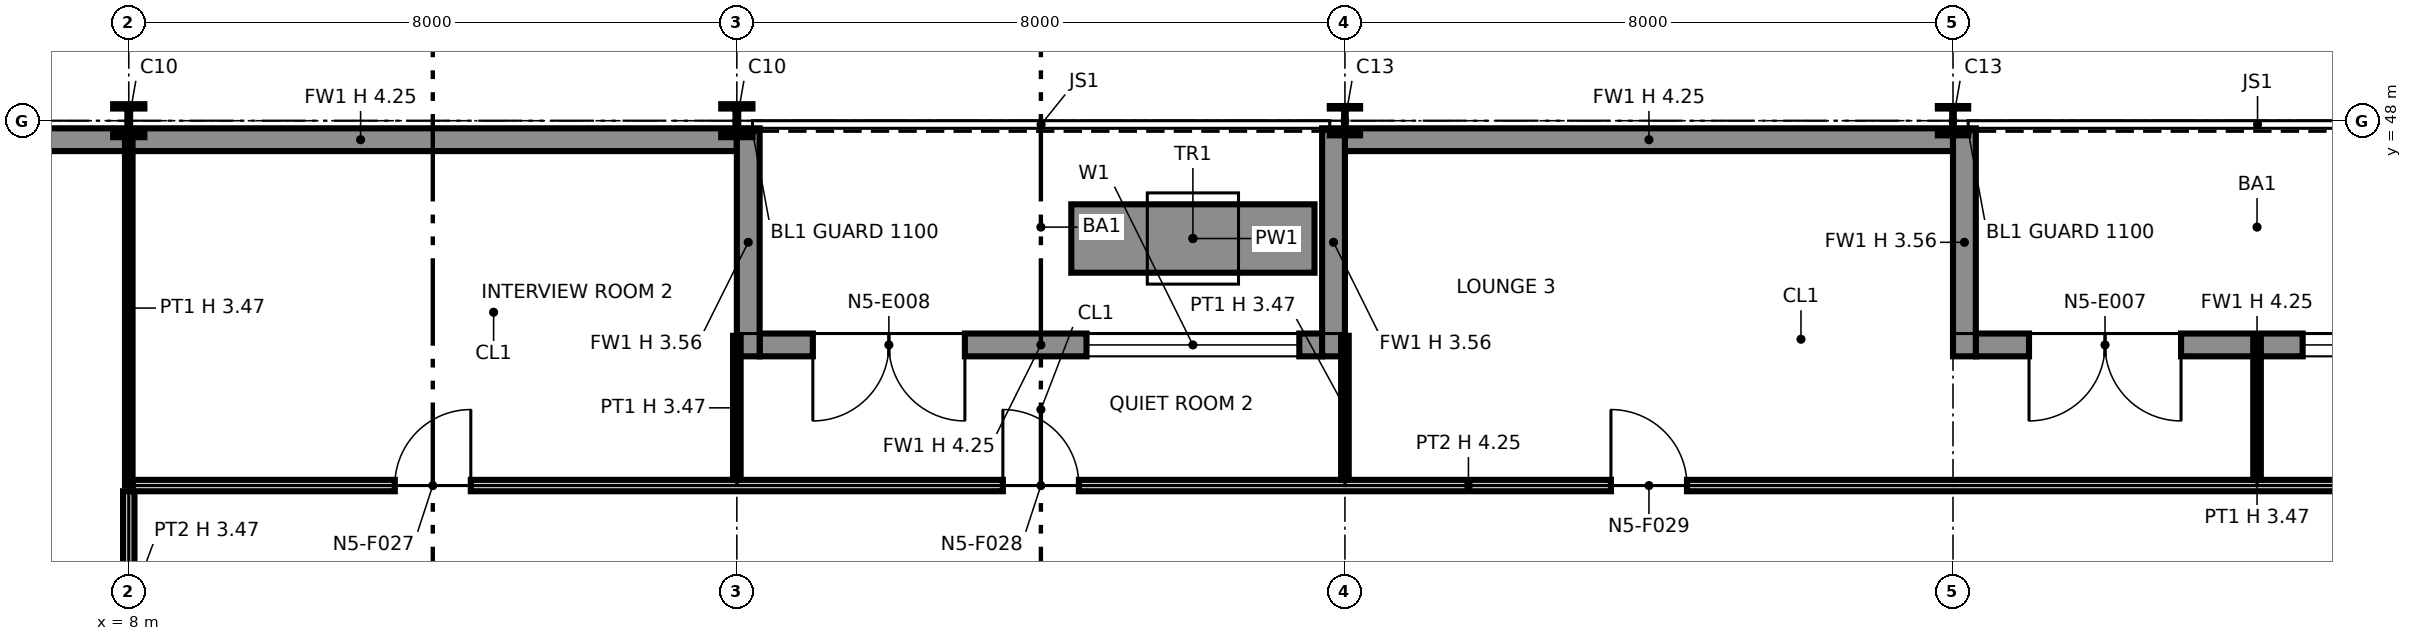
"""IFC4 building model, lengths in metres.
Left out: names, types, materials, properties, quantities, classifications, styles, units other than length and angle.
Written with IfcOpenShell. Run it as: python <this file> out.ifc"""

import sys

from ifc_helpers import new_model, si_unit, direction, frame, frame_2d, origin, origin_2d, place, context, subcontext, project, spatial, rectangle, i_section, extrude, element, fill, save


model = new_model("IFC4")
c1 = context("Model", 3, precision=1e-05, world=origin(), true_north=direction((0.0, 1.0)))
c2 = subcontext(c1, "Body", "Model", "MODEL_VIEW")
j1 = project(units=[si_unit("LENGTHUNIT", "METRE"), si_unit("PLANEANGLEUNIT", "RADIAN")], contexts=[c1])
p1 = place(None, origin())
s1 = spatial("IfcSite", under=j1, at=p1, CompositionType="ELEMENT")
p2 = place(p1, origin())
s2 = spatial("IfcBuilding", under=s1, at=p2, CompositionType="ELEMENT")
p3 = place(p2, frame((0.0, 0.0, 92.0)))
s3 = spatial("IfcBuildingStorey", under=s2, at=p3, CompositionType="ELEMENT", Elevation=92.0)
for number, where, z_axis, x_axis in (
    (1, (8.0, 48.0, 0.0), (0.0, 0.0, 1.0), (1.0, 0.0, 0.0)),
    (2, (16.0, 48.0, 0.0), (0.0, 0.0, 1.0), (1.0, 0.0, 0.0)),
):
    element("IfcColumn", number, at=place(p3, frame(where, z_axis=z_axis, x_axis=x_axis)), inside=s3, PredefinedType="COLUMN", context=c2, shape_type="SweptSolid", body=[
        extrude(i_section(OverallWidth=0.411, OverallDepth=0.434, WebThickness=0.036, FlangeThickness=0.057, at=origin_2d()), origin(), (0.0, 0.0, 1.0), 4.25),
    ])
for number, where, z_axis, x_axis in (
    (3, (24.0, 48.0, 0.0), (0.0, 0.0, 1.0), (1.0, 0.0, 0.0)),
    (4, (32.0, 48.0, 0.0), (0.0, 0.0, 1.0), (1.0, 0.0, 0.0)),
):
    element("IfcColumn", number, at=place(p3, frame(where, z_axis=z_axis, x_axis=x_axis)), inside=s3, PredefinedType="COLUMN", context=c2, shape_type="SweptSolid", body=[
        extrude(i_section(OverallWidth=0.399, OverallDepth=0.386, WebThickness=0.021, FlangeThickness=0.033, at=origin_2d()), origin(), (0.0, 0.0, 1.0), 4.25),
    ])
p4 = place(p3, frame((39.7, 45.05, 0.0), z_axis=(0.0, 0.0, 1.0), x_axis=(-1.0, 0.0, 0.0)))
e5 = element("IfcWall", 5, at=p4, inside=s3, PredefinedType="SOLIDWALL", context=c2, shape_type="SweptSolid", body=[
    extrude(rectangle(XDim=7.4, YDim=0.3, at=frame_2d((3.7, 0.0))), origin(), (0.0, 0.0, 1.0), 4.25),
])
p5 = place(p4, frame((0.3, 0.0, 0.9)))
e6 = element("IfcOpeningElement", 6, at=p5, cuts=e5, PredefinedType="OPENING", context=c2, shape_type="SweptSolid", body=[
    extrude(rectangle(XDim=2.8, YDim=2.2, at=frame_2d((1.4, 1.1))), frame((0.0, 0.16, 0.0), z_axis=(0.0, -1.0, 0.0), x_axis=(1.0, 0.0, 0.0)), (0.0, 0.0, 1.0), 0.32),
])
p6 = place(p4, frame((4.7, 0.0, 0.0)))
e7 = element("IfcOpeningElement", 7, at=p6, cuts=e5, PredefinedType="OPENING", context=c2, shape_type="SweptSolid", body=[
    extrude(rectangle(XDim=2.0, YDim=2.4, at=frame_2d((1.0, 1.2))), frame((0.0, 0.16, 0.0), z_axis=(0.0, -1.0, 0.0), x_axis=(1.0, 0.0, 0.0)), (0.0, 0.0, 1.0), 0.32),
])
p7 = place(p3, frame((32.15, 47.9, 0.0), z_axis=(0.0, 0.0, 1.0), x_axis=(0.0, -1.0, 0.0)))
e8 = element("IfcWall", 8, at=p7, inside=s3, PredefinedType="SOLIDWALL", context=c2, shape_type="SweptSolid", body=[
    extrude(rectangle(XDim=3.0, YDim=0.3, at=frame_2d((1.5, 0.0))), origin(), (0.0, 0.0, 1.0), 3.556),
])
p8 = place(p3, frame((32.0, 47.75, 0.0), z_axis=(0.0, 0.0, 1.0), x_axis=(-1.0, 0.0, 0.0)))
e9 = element("IfcWall", 9, at=p8, inside=s3, PredefinedType="SOLIDWALL", context=c2, shape_type="SweptSolid", body=[
    extrude(rectangle(XDim=8.0, YDim=0.3, at=frame_2d((4.0, 0.0))), origin(), (0.0, 0.0, 1.0), 4.25),
])
p9 = place(p3, frame((23.7, 45.05, 0.0), z_axis=(0.0, 0.0, 1.0), x_axis=(-1.0, 0.0, 0.0)))
e10 = element("IfcWall", 10, at=p9, inside=s3, PredefinedType="SOLIDWALL", context=c2, shape_type="SweptSolid", body=[
    extrude(rectangle(XDim=7.4, YDim=0.3, at=frame_2d((3.7, 0.0))), origin(), (0.0, 0.0, 1.0), 4.25),
])
p10 = place(p9, frame((0.3, 0.0, 0.9)))
e11 = element("IfcOpeningElement", 11, at=p10, cuts=e10, PredefinedType="OPENING", context=c2, shape_type="SweptSolid", body=[
    extrude(rectangle(XDim=2.8, YDim=2.2, at=frame_2d((1.4, 1.1))), frame((0.0, 0.16, 0.0), z_axis=(0.0, -1.0, 0.0), x_axis=(1.0, 0.0, 0.0)), (0.0, 0.0, 1.0), 0.32),
])
p11 = place(p9, frame((4.7, 0.0, 0.0)))
e12 = element("IfcOpeningElement", 12, at=p11, cuts=e10, PredefinedType="OPENING", context=c2, shape_type="SweptSolid", body=[
    extrude(rectangle(XDim=2.0, YDim=2.4, at=frame_2d((1.0, 1.2))), frame((0.0, 0.16, 0.0), z_axis=(0.0, -1.0, 0.0), x_axis=(1.0, 0.0, 0.0)), (0.0, 0.0, 1.0), 0.32),
])
for number, where, z_axis, x_axis in (
    (13, (23.85, 47.9, 0.0), (0.0, 0.0, 1.0), (0.0, -1.0, 0.0)),
    (14, (16.15, 47.9, 0.0), (0.0, 0.0, 1.0), (0.0, -1.0, 0.0)),
):
    element("IfcWall", number, at=place(p3, frame(where, z_axis=z_axis, x_axis=x_axis)), inside=s3, PredefinedType="SOLIDWALL", context=c2, shape_type="SweptSolid", body=[
        extrude(rectangle(XDim=3.0, YDim=0.3, at=frame_2d((1.5, 0.0))), origin(), (0.0, 0.0, 1.0), 3.556),
    ])
p12 = place(p3, frame((16.0, 47.75, 0.0), z_axis=(0.0, 0.0, 1.0), x_axis=(-1.0, 0.0, 0.0)))
e15 = element("IfcWall", 15, at=p12, inside=s3, PredefinedType="SOLIDWALL", context=c2, shape_type="SweptSolid", body=[
    extrude(rectangle(XDim=9.9, YDim=0.3, at=frame_2d((4.95, 0.0))), origin(), (0.0, 0.0, 1.0), 4.25),
])
p13 = place(p3, frame((23.6, 46.45, 0.0), z_axis=(0.0, 0.0, 1.0), x_axis=(-1.0, 0.0, 0.0)))
e16 = element("IfcWall", 16, at=p13, inside=s3, PredefinedType="SOLIDWALL", context=c2, shape_type="SweptSolid", body=[
    extrude(rectangle(XDim=3.2, YDim=0.9, at=frame_2d((1.6, 0.0))), origin(), (0.0, 0.0, 1.0), 0.6),
])
p14 = place(p3, frame((8.0, 40.03, 0.0), z_axis=(0.0, 0.0, 1.0), x_axis=(0.0, 1.0, 0.0)))
e17 = element("IfcWall", 17, at=p14, inside=s3, PredefinedType="PARTITIONING", context=c2, shape_type="SweptSolid", body=[
    extrude(rectangle(XDim=3.095, YDim=0.15, at=frame_2d((1.547, 0.0))), origin(), (0.0, 0.0, 1.0), 3.47),
])
p15 = place(p14, frame((1.07, 0.0, 0.0)))
e18 = element("IfcOpeningElement", 18, at=p15, cuts=e17, PredefinedType="OPENING", context=c2, shape_type="SweptSolid", body=[
    extrude(rectangle(XDim=1.0, YDim=2.1, at=frame_2d((0.5, 1.05))), frame((0.0, 0.085, 0.0), z_axis=(0.0, -1.0, 0.0), x_axis=(1.0, 0.0, 0.0)), (0.0, 0.0, 1.0), 0.17),
])
p16 = place(p3, frame((8.05, 43.2, 0.0), z_axis=(0.0, 0.0, 1.0), x_axis=(1.0, 0.0, 0.0)))
e19 = element("IfcWall", 19, at=p16, inside=s3, PredefinedType="PARTITIONING", context=c2, shape_type="SweptSolid", body=[
    extrude(rectangle(XDim=35.15, YDim=0.15, at=frame_2d((17.575, 0.0))), origin(), (0.0, 0.0, 1.0), 4.25),
])
p17 = place(p16, frame((3.45, 0.0, 0.0)))
e20 = element("IfcOpeningElement", 20, at=p17, cuts=e19, PredefinedType="OPENING", context=c2, shape_type="SweptSolid", body=[
    extrude(rectangle(XDim=1.0, YDim=2.1, at=frame_2d((0.5, 1.05))), frame((0.0, 0.085, 0.0), z_axis=(0.0, -1.0, 0.0), x_axis=(1.0, 0.0, 0.0)), (0.0, 0.0, 1.0), 0.17),
])
p18 = place(p16, frame((11.45, 0.0, 0.0)))
e21 = element("IfcOpeningElement", 21, at=p18, cuts=e19, PredefinedType="OPENING", context=c2, shape_type="SweptSolid", body=[
    extrude(rectangle(XDim=1.0, YDim=2.1, at=frame_2d((0.5, 1.05))), frame((0.0, 0.085, 0.0), z_axis=(0.0, -1.0, 0.0), x_axis=(1.0, 0.0, 0.0)), (0.0, 0.0, 1.0), 0.17),
])
p19 = place(p16, frame((19.45, 0.0, 0.0)))
e22 = element("IfcOpeningElement", 22, at=p19, cuts=e19, PredefinedType="OPENING", context=c2, shape_type="SweptSolid", body=[
    extrude(rectangle(XDim=1.0, YDim=2.1, at=frame_2d((0.5, 1.05))), frame((0.0, 0.085, 0.0), z_axis=(0.0, -1.0, 0.0), x_axis=(1.0, 0.0, 0.0)), (0.0, 0.0, 1.0), 0.17),
])
p20 = place(p16, frame((29.45, 0.0, 0.0)))
e23 = element("IfcOpeningElement", 23, at=p20, cuts=e19, PredefinedType="OPENING", context=c2, shape_type="SweptSolid", body=[
    extrude(rectangle(XDim=1.0, YDim=2.1, at=frame_2d((0.5, 1.05))), frame((0.0, 0.085, 0.0), z_axis=(0.0, -1.0, 0.0), x_axis=(1.0, 0.0, 0.0)), (0.0, 0.0, 1.0), 0.17),
])
p21 = place(p3, frame((8.0, 43.2, 0.0), z_axis=(0.0, 0.0, 1.0), x_axis=(0.0, 1.0, 0.0)))
e24 = element("IfcWall", 24, at=p21, inside=s3, PredefinedType="PARTITIONING", context=c2, shape_type="SweptSolid", body=[
    extrude(rectangle(XDim=4.67, YDim=0.1, at=frame_2d((2.335, 0.0))), origin(), (0.0, 0.0, 1.0), 3.47),
])
for number, where, z_axis, x_axis in (
    (25, (16.0, 43.275, 0.0), (0.0, 0.0, 1.0), (0.0, 1.0, 0.0)),
    (26, (24.0, 43.275, 0.0), (0.0, 0.0, 1.0), (0.0, 1.0, 0.0)),
    (27, (36.0, 43.275, 0.0), (0.0, 0.0, 1.0), (0.0, 1.0, 0.0)),
):
    element("IfcWall", number, at=place(p3, frame(where, z_axis=z_axis, x_axis=x_axis)), inside=s3, PredefinedType="PARTITIONING", context=c2, shape_type="SweptSolid", body=[
        extrude(rectangle(XDim=1.895, YDim=0.1, at=frame_2d((0.948, 0.0))), origin(), (0.0, 0.0, 1.0), 3.47),
    ])
p22 = place(p5, origin())
e28 = element("IfcWindow", 28, at=p22, inside=s3, PartitioningType="SINGLE_PANEL", PredefinedType="WINDOW", context=c2, shape_type="SweptSolid", body=[
    extrude(rectangle(XDim=2.8, YDim=2.2, at=frame_2d((1.4, 1.1))), frame((0.0, 0.03, 0.0), z_axis=(0.0, -1.0, 0.0), x_axis=(1.0, 0.0, 0.0)), (0.0, 0.0, 1.0), 0.06),
])
fill(e6, e28)
p23 = place(p6, origin())
e29 = element("IfcDoor", 29, at=p23, inside=s3, OperationType="DOUBLE_DOOR_SINGLE_SWING", PredefinedType="DOOR", context=c2, shape_type="SweptSolid", body=[
    extrude(rectangle(XDim=2.0, YDim=2.4, at=frame_2d((1.0, 1.2))), frame((0.0, 0.025, 0.0), z_axis=(0.0, -1.0, 0.0), x_axis=(1.0, 0.0, 0.0)), (0.0, 0.0, 1.0), 0.05),
])
fill(e7, e29)
p24 = place(p10, origin())
e30 = element("IfcWindow", 30, at=p24, inside=s3, PartitioningType="SINGLE_PANEL", PredefinedType="WINDOW", context=c2, shape_type="SweptSolid", body=[
    extrude(rectangle(XDim=2.8, YDim=2.2, at=frame_2d((1.4, 1.1))), frame((0.0, 0.03, 0.0), z_axis=(0.0, -1.0, 0.0), x_axis=(1.0, 0.0, 0.0)), (0.0, 0.0, 1.0), 0.06),
])
fill(e11, e30)
p25 = place(p11, origin())
e31 = element("IfcDoor", 31, at=p25, inside=s3, OperationType="DOUBLE_DOOR_SINGLE_SWING", PredefinedType="DOOR", context=c2, shape_type="SweptSolid", body=[
    extrude(rectangle(XDim=2.0, YDim=2.4, at=frame_2d((1.0, 1.2))), frame((0.0, 0.025, 0.0), z_axis=(0.0, -1.0, 0.0), x_axis=(1.0, 0.0, 0.0)), (0.0, 0.0, 1.0), 0.05),
])
fill(e12, e31)
p26 = place(p17, origin())
e32 = element("IfcDoor", 32, at=p26, inside=s3, OperationType="SINGLE_SWING_RIGHT", PredefinedType="DOOR", context=c2, shape_type="SweptSolid", body=[
    extrude(rectangle(XDim=1.0, YDim=2.1, at=frame_2d((0.5, 1.05))), frame((0.0, 0.025, 0.0), z_axis=(0.0, -1.0, 0.0), x_axis=(1.0, 0.0, 0.0)), (0.0, 0.0, 1.0), 0.05),
])
fill(e20, e32)
p27 = place(p18, origin())
e33 = element("IfcDoor", 33, at=p27, inside=s3, OperationType="SINGLE_SWING_LEFT", PredefinedType="DOOR", context=c2, shape_type="SweptSolid", body=[
    extrude(rectangle(XDim=1.0, YDim=2.1, at=frame_2d((0.5, 1.05))), frame((0.0, 0.025, 0.0), z_axis=(0.0, -1.0, 0.0), x_axis=(1.0, 0.0, 0.0)), (0.0, 0.0, 1.0), 0.05),
])
fill(e21, e33)
p28 = place(p19, origin())
e34 = element("IfcDoor", 34, at=p28, inside=s3, OperationType="SINGLE_SWING_LEFT", PredefinedType="DOOR", context=c2, shape_type="SweptSolid", body=[
    extrude(rectangle(XDim=1.0, YDim=2.1, at=frame_2d((0.5, 1.05))), frame((0.0, 0.025, 0.0), z_axis=(0.0, -1.0, 0.0), x_axis=(1.0, 0.0, 0.0)), (0.0, 0.0, 1.0), 0.05),
])
fill(e22, e34)
save(model, sys.argv[1])
